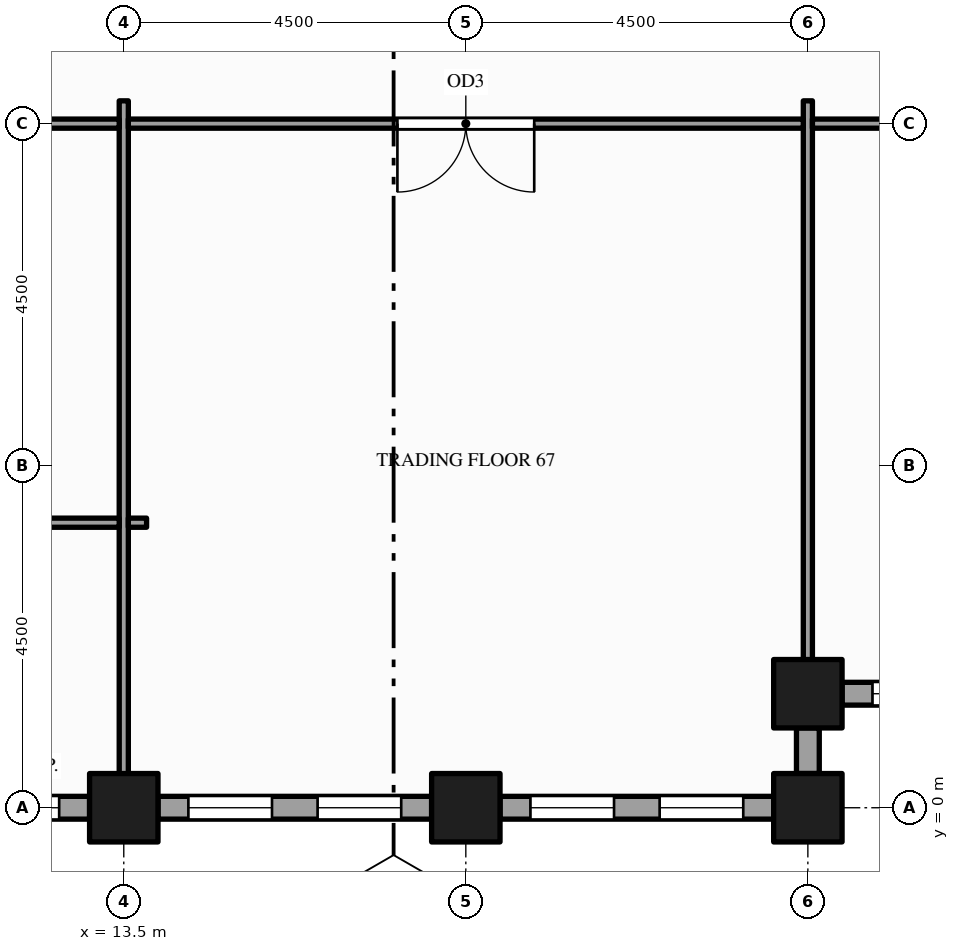
"""IFC4 building model, lengths in metres.
Left out: names, types, materials, properties, quantities, classifications, styles, units other than length and angle.
Written with IfcOpenShell. Run it as: python <this file> out.ifc"""

import sys

from ifc_helpers import new_model, si_unit, direction, frame, frame_2d, origin, origin_2d, place, context, subcontext, project, spatial, rectangle, hollow_rectangle, extrude, element, fill, save


model = new_model("IFC4")
c1 = context("Model", 3, precision=1e-05, world=origin(), true_north=direction((0.0, 1.0)))
c2 = subcontext(c1, "Body", "Model", "MODEL_VIEW")
j1 = project(units=[si_unit("LENGTHUNIT", "METRE"), si_unit("PLANEANGLEUNIT", "RADIAN")], contexts=[c1])
p1 = place(None, origin())
s1 = spatial("IfcSite", under=j1, at=p1, CompositionType="ELEMENT")
p2 = place(p1, origin())
s2 = spatial("IfcBuilding", under=s1, at=p2, CompositionType="ELEMENT")
p3 = place(p2, frame((0.0, 0.0, 179.0)))
s3 = spatial("IfcBuildingStorey", under=s2, at=p3, CompositionType="ELEMENT", Elevation=179.0)
for number, where, z_axis, x_axis in (
    (1, (13.5, 0.0, -0.15), (0.0, 0.0, 1.0), (1.0, 0.0, 0.0)),
    (2, (18.0, 0.0, -0.15), (0.0, 0.0, 1.0), (1.0, 0.0, 0.0)),
    (3, (22.5, 0.0, -0.15), (0.0, 0.0, 1.0), (1.0, 0.0, 0.0)),
    (4, (22.5, 1.5, -0.15), (0.0, 0.0, 1.0), (1.0, 0.0, 0.0)),
):
    element("IfcColumn", number, at=place(p3, frame(where, z_axis=z_axis, x_axis=x_axis)), inside=s3, PredefinedType="COLUMN", context=c2, shape_type="SweptSolid", body=[
        extrude(hollow_rectangle(XDim=0.9, YDim=0.9, WallThickness=0.045, at=origin_2d()), origin(), (0.0, 0.0, 1.0), 4.0),
    ])
p4 = place(p3, frame((9.45, 0.0, 0.0), z_axis=(0.0, 0.0, 1.0), x_axis=(1.0, 0.0, 0.0)))
e5 = element("IfcWall", 5, at=p4, inside=s3, PredefinedType="STANDARD", context=c2, shape_type="SweptSolid", body=[
    extrude(rectangle(XDim=3.6, YDim=0.3, at=frame_2d((1.8, 0.0))), origin(), (0.0, 0.0, 1.0), 2.87),
])
p5 = place(p4, frame((0.4, 0.0, 0.9)))
e6 = element("IfcOpeningElement", 6, at=p5, cuts=e5, PredefinedType="OPENING", context=c2, shape_type="SweptSolid", body=[
    extrude(rectangle(XDim=1.1, YDim=1.75, at=frame_2d((0.55, 0.875))), frame((0.0, 0.16, 0.0), z_axis=(0.0, -1.0, 0.0), x_axis=(1.0, 0.0, 0.0)), (0.0, 0.0, 1.0), 0.32),
])
p6 = place(p4, frame((2.1, 0.0, 0.9)))
e7 = element("IfcOpeningElement", 7, at=p6, cuts=e5, PredefinedType="OPENING", context=c2, shape_type="SweptSolid", body=[
    extrude(rectangle(XDim=1.1, YDim=1.75, at=frame_2d((0.55, 0.875))), frame((0.0, 0.16, 0.0), z_axis=(0.0, -1.0, 0.0), x_axis=(1.0, 0.0, 0.0)), (0.0, 0.0, 1.0), 0.32),
])
p7 = place(p3, frame((13.95, 0.0, 0.0), z_axis=(0.0, 0.0, 1.0), x_axis=(1.0, 0.0, 0.0)))
e8 = element("IfcWall", 8, at=p7, inside=s3, PredefinedType="STANDARD", context=c2, shape_type="SweptSolid", body=[
    extrude(rectangle(XDim=3.6, YDim=0.3, at=frame_2d((1.8, 0.0))), origin(), (0.0, 0.0, 1.0), 2.87),
])
p8 = place(p7, frame((0.4, 0.0, 0.9)))
e9 = element("IfcOpeningElement", 9, at=p8, cuts=e8, PredefinedType="OPENING", context=c2, shape_type="SweptSolid", body=[
    extrude(rectangle(XDim=1.1, YDim=1.75, at=frame_2d((0.55, 0.875))), frame((0.0, 0.16, 0.0), z_axis=(0.0, -1.0, 0.0), x_axis=(1.0, 0.0, 0.0)), (0.0, 0.0, 1.0), 0.32),
])
p9 = place(p7, frame((2.1, 0.0, 0.9)))
e10 = element("IfcOpeningElement", 10, at=p9, cuts=e8, PredefinedType="OPENING", context=c2, shape_type="SweptSolid", body=[
    extrude(rectangle(XDim=1.1, YDim=1.75, at=frame_2d((0.55, 0.875))), frame((0.0, 0.16, 0.0), z_axis=(0.0, -1.0, 0.0), x_axis=(1.0, 0.0, 0.0)), (0.0, 0.0, 1.0), 0.32),
])
p10 = place(p3, frame((18.45, 0.0, 0.0), z_axis=(0.0, 0.0, 1.0), x_axis=(1.0, 0.0, 0.0)))
e11 = element("IfcWall", 11, at=p10, inside=s3, PredefinedType="STANDARD", context=c2, shape_type="SweptSolid", body=[
    extrude(rectangle(XDim=3.6, YDim=0.3, at=frame_2d((1.8, 0.0))), origin(), (0.0, 0.0, 1.0), 2.87),
])
p11 = place(p10, frame((0.4, 0.0, 0.9)))
e12 = element("IfcOpeningElement", 12, at=p11, cuts=e11, PredefinedType="OPENING", context=c2, shape_type="SweptSolid", body=[
    extrude(rectangle(XDim=1.1, YDim=1.75, at=frame_2d((0.55, 0.875))), frame((0.0, 0.16, 0.0), z_axis=(0.0, -1.0, 0.0), x_axis=(1.0, 0.0, 0.0)), (0.0, 0.0, 1.0), 0.32),
])
p12 = place(p10, frame((2.1, 0.0, 0.9)))
e13 = element("IfcOpeningElement", 13, at=p12, cuts=e11, PredefinedType="OPENING", context=c2, shape_type="SweptSolid", body=[
    extrude(rectangle(XDim=1.1, YDim=1.75, at=frame_2d((0.55, 0.875))), frame((0.0, 0.16, 0.0), z_axis=(0.0, -1.0, 0.0), x_axis=(1.0, 0.0, 0.0)), (0.0, 0.0, 1.0), 0.32),
])
p13 = place(p3, frame((22.5, 0.45, 0.0), z_axis=(0.0, 0.0, 1.0), x_axis=(0.0, 1.0, 0.0)))
e14 = element("IfcWall", 14, at=p13, inside=s3, PredefinedType="STANDARD", context=c2, shape_type="SweptSolid", body=[
    extrude(rectangle(XDim=0.6, YDim=0.3, at=frame_2d((0.3, 0.0))), origin(), (0.0, 0.0, 1.0), 3.149),
])
p14 = place(p3, frame((22.95, 1.5, 0.0), z_axis=(0.0, 0.0, 1.0), x_axis=(1.0, 0.0, 0.0)))
e15 = element("IfcWall", 15, at=p14, inside=s3, PredefinedType="STANDARD", context=c2, shape_type="SweptSolid", body=[
    extrude(rectangle(XDim=3.6, YDim=0.3, at=frame_2d((1.8, 0.0))), origin(), (0.0, 0.0, 1.0), 2.87),
])
p15 = place(p14, frame((0.4, 0.0, 0.9)))
e16 = element("IfcOpeningElement", 16, at=p15, cuts=e15, PredefinedType="OPENING", context=c2, shape_type="SweptSolid", body=[
    extrude(rectangle(XDim=1.1, YDim=1.75, at=frame_2d((0.55, 0.875))), frame((0.0, 0.16, 0.0), z_axis=(0.0, -1.0, 0.0), x_axis=(1.0, 0.0, 0.0)), (0.0, 0.0, 1.0), 0.32),
])
p16 = place(p14, frame((2.1, 0.0, 0.9)))
e17 = element("IfcOpeningElement", 17, at=p16, cuts=e15, PredefinedType="OPENING", context=c2, shape_type="SweptSolid", body=[
    extrude(rectangle(XDim=1.1, YDim=1.75, at=frame_2d((0.55, 0.875))), frame((0.0, 0.16, 0.0), z_axis=(0.0, -1.0, 0.0), x_axis=(1.0, 0.0, 0.0)), (0.0, 0.0, 1.0), 0.32),
])
p17 = place(p3, frame((13.5, 0.15, 0.0), z_axis=(0.0, 0.0, 1.0), x_axis=(0.0, 1.0, 0.0)))
e18 = element("IfcWall", 18, at=p17, inside=s3, PredefinedType="PARTITIONING", context=c2, shape_type="SweptSolid", body=[
    extrude(rectangle(XDim=9.15, YDim=0.12, at=frame_2d((4.575, 0.0))), origin(), (0.0, 0.0, 1.0), 2.87),
])
p18 = place(p3, frame((22.5, 1.65, 0.0), z_axis=(0.0, 0.0, 1.0), x_axis=(0.0, 1.0, 0.0)))
e19 = element("IfcWall", 19, at=p18, inside=s3, PredefinedType="PARTITIONING", context=c2, shape_type="SweptSolid", body=[
    extrude(rectangle(XDim=7.65, YDim=0.12, at=frame_2d((3.825, 0.0))), origin(), (0.0, 0.0, 1.0), 2.87),
])
p19 = place(p3, frame((9.125, 3.75, 0.0), z_axis=(0.0, 0.0, 1.0), x_axis=(1.0, 0.0, 0.0)))
e20 = element("IfcWall", 20, at=p19, inside=s3, PredefinedType="PARTITIONING", context=c2, shape_type="SweptSolid", body=[
    extrude(rectangle(XDim=4.315, YDim=0.12, at=frame_2d((2.157, 0.0))), origin(), (0.0, 0.0, 1.0), 2.87),
])
p20 = place(p3, frame((13.56, 3.75, 0.0), z_axis=(0.0, 0.0, 1.0), x_axis=(1.0, 0.0, 0.0)))
e21 = element("IfcWall", 21, at=p20, inside=s3, PredefinedType="PARTITIONING", context=c2, shape_type="SweptSolid", body=[
    extrude(rectangle(XDim=0.24, YDim=0.12, at=frame_2d((0.12, 0.0))), origin(), (0.0, 0.0, 1.0), 2.87),
])
p21 = place(p3, frame((0.15, 9.0, 0.0), z_axis=(0.0, 0.0, 1.0), x_axis=(1.0, 0.0, 0.0)))
e22 = element("IfcWall", 22, at=p21, inside=s3, PredefinedType="PARTITIONING", context=c2, shape_type="SweptSolid", body=[
    extrude(rectangle(XDim=13.29, YDim=0.12, at=frame_2d((6.645, 0.0))), origin(), (0.0, 0.0, 1.0), 2.87),
])
p22 = place(p21, frame((6.055, 0.0, 0.0)))
e23 = element("IfcOpeningElement", 23, at=p22, cuts=e22, PredefinedType="OPENING", context=c2, shape_type="SweptSolid", body=[
    extrude(rectangle(XDim=1.2, YDim=2.1, at=frame_2d((0.6, 1.05))), frame((0.0, 0.07, 0.0), z_axis=(0.0, -1.0, 0.0), x_axis=(1.0, 0.0, 0.0)), (0.0, 0.0, 1.0), 0.14),
])
p23 = place(p3, frame((13.56, 9.0, 0.0), z_axis=(0.0, 0.0, 1.0), x_axis=(1.0, 0.0, 0.0)))
e24 = element("IfcWall", 24, at=p23, inside=s3, PredefinedType="PARTITIONING", context=c2, shape_type="SweptSolid", body=[
    extrude(rectangle(XDim=8.88, YDim=0.12, at=frame_2d((4.44, 0.0))), origin(), (0.0, 0.0, 1.0), 2.87),
])
p24 = place(p23, frame((3.54, 0.0, 0.0)))
e25 = element("IfcOpeningElement", 25, at=p24, cuts=e24, PredefinedType="OPENING", context=c2, shape_type="SweptSolid", body=[
    extrude(rectangle(XDim=1.8, YDim=2.1, at=frame_2d((0.9, 1.05))), frame((0.0, 0.07, 0.0), z_axis=(0.0, -1.0, 0.0), x_axis=(1.0, 0.0, 0.0)), (0.0, 0.0, 1.0), 0.14),
])
p25 = place(p3, frame((22.56, 9.0, 0.0), z_axis=(0.0, 0.0, 1.0), x_axis=(1.0, 0.0, 0.0)))
e26 = element("IfcWall", 26, at=p25, inside=s3, PredefinedType="PARTITIONING", context=c2, shape_type="SweptSolid", body=[
    extrude(rectangle(XDim=4.38, YDim=0.12, at=frame_2d((2.19, 0.0))), origin(), (0.0, 0.0, 1.0), 2.87),
])
p26 = place(p25, frame((1.74, 0.0, 0.0)))
e27 = element("IfcOpeningElement", 27, at=p26, cuts=e26, PredefinedType="OPENING", context=c2, shape_type="SweptSolid", body=[
    extrude(rectangle(XDim=0.9, YDim=2.1, at=frame_2d((0.45, 1.05))), frame((0.0, 0.07, 0.0), z_axis=(0.0, -1.0, 0.0), x_axis=(1.0, 0.0, 0.0)), (0.0, 0.0, 1.0), 0.14),
])
p27 = place(p6, origin())
e28 = element("IfcWindow", 28, at=p27, inside=s3, PartitioningType="SINGLE_PANEL", PredefinedType="WINDOW", context=c2, shape_type="SweptSolid", body=[
    extrude(rectangle(XDim=1.1, YDim=1.75, at=frame_2d((0.55, 0.875))), frame((0.0, 0.03, 0.0), z_axis=(0.0, -1.0, 0.0), x_axis=(1.0, 0.0, 0.0)), (0.0, 0.0, 1.0), 0.06),
])
fill(e7, e28)
p28 = place(p8, origin())
e29 = element("IfcWindow", 29, at=p28, inside=s3, PartitioningType="SINGLE_PANEL", PredefinedType="WINDOW", context=c2, shape_type="SweptSolid", body=[
    extrude(rectangle(XDim=1.1, YDim=1.75, at=frame_2d((0.55, 0.875))), frame((0.0, 0.03, 0.0), z_axis=(0.0, -1.0, 0.0), x_axis=(1.0, 0.0, 0.0)), (0.0, 0.0, 1.0), 0.06),
])
fill(e9, e29)
p29 = place(p9, origin())
e30 = element("IfcWindow", 30, at=p29, inside=s3, PartitioningType="SINGLE_PANEL", PredefinedType="WINDOW", context=c2, shape_type="SweptSolid", body=[
    extrude(rectangle(XDim=1.1, YDim=1.75, at=frame_2d((0.55, 0.875))), frame((0.0, 0.03, 0.0), z_axis=(0.0, -1.0, 0.0), x_axis=(1.0, 0.0, 0.0)), (0.0, 0.0, 1.0), 0.06),
])
fill(e10, e30)
p30 = place(p11, origin())
e31 = element("IfcWindow", 31, at=p30, inside=s3, PartitioningType="SINGLE_PANEL", PredefinedType="WINDOW", context=c2, shape_type="SweptSolid", body=[
    extrude(rectangle(XDim=1.1, YDim=1.75, at=frame_2d((0.55, 0.875))), frame((0.0, 0.03, 0.0), z_axis=(0.0, -1.0, 0.0), x_axis=(1.0, 0.0, 0.0)), (0.0, 0.0, 1.0), 0.06),
])
fill(e12, e31)
p31 = place(p12, origin())
e32 = element("IfcWindow", 32, at=p31, inside=s3, PartitioningType="SINGLE_PANEL", PredefinedType="WINDOW", context=c2, shape_type="SweptSolid", body=[
    extrude(rectangle(XDim=1.1, YDim=1.75, at=frame_2d((0.55, 0.875))), frame((0.0, 0.03, 0.0), z_axis=(0.0, -1.0, 0.0), x_axis=(1.0, 0.0, 0.0)), (0.0, 0.0, 1.0), 0.06),
])
fill(e13, e32)
p32 = place(p15, origin())
e33 = element("IfcWindow", 33, at=p32, inside=s3, PartitioningType="SINGLE_PANEL", PredefinedType="WINDOW", context=c2, shape_type="SweptSolid", body=[
    extrude(rectangle(XDim=1.1, YDim=1.75, at=frame_2d((0.55, 0.875))), frame((0.0, 0.03, 0.0), z_axis=(0.0, -1.0, 0.0), x_axis=(1.0, 0.0, 0.0)), (0.0, 0.0, 1.0), 0.06),
])
fill(e16, e33)
p33 = place(p24, origin())
e34 = element("IfcDoor", 34, at=p33, inside=s3, OperationType="DOUBLE_DOOR_SINGLE_SWING", PredefinedType="DOOR", context=c2, shape_type="SweptSolid", body=[
    extrude(rectangle(XDim=1.8, YDim=2.1, at=frame_2d((0.9, 1.05))), frame((0.0, 0.025, 0.0), z_axis=(0.0, -1.0, 0.0), x_axis=(1.0, 0.0, 0.0)), (0.0, 0.0, 1.0), 0.05),
])
fill(e25, e34)
save(model, sys.argv[1])
